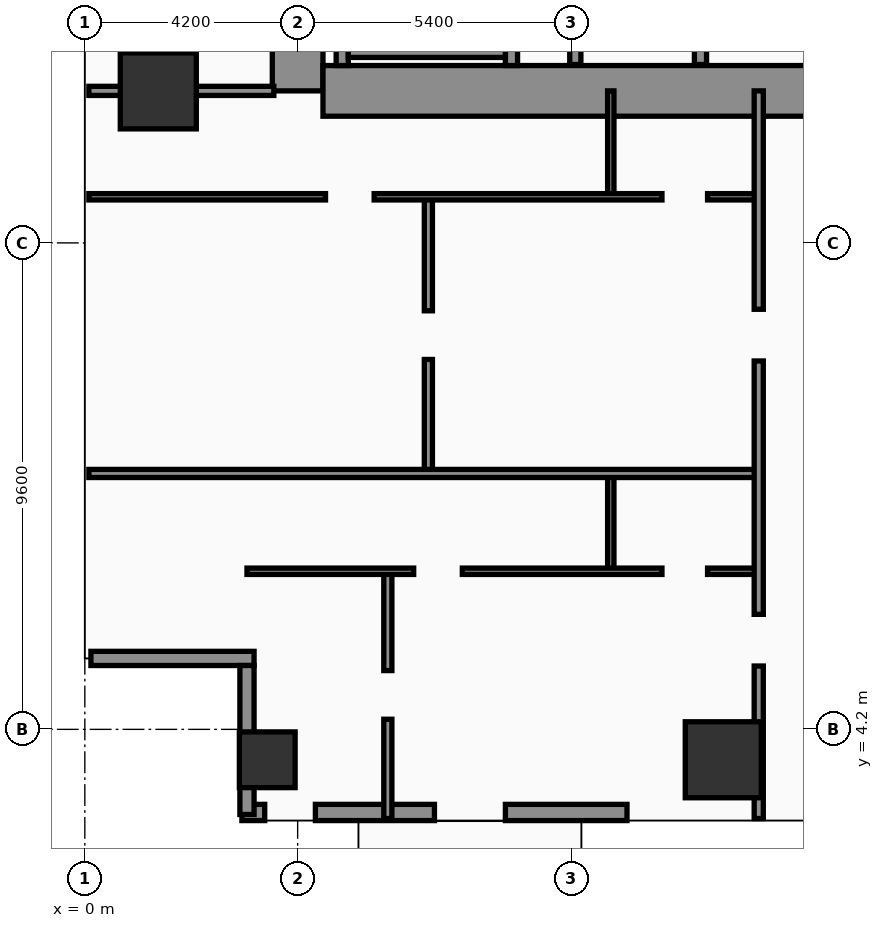
"""IFC4 building model, lengths in metres.
Left out: names, types, materials, properties, quantities, classifications, styles, units other than length and angle.
Written with IfcOpenShell. Run it as: python <this file> out.ifc"""

import sys

from ifc_helpers import new_model, si_unit, direction, frame, frame_2d, origin, origin_2d, place, context, subcontext, project, spatial, rectangle, hollow_rectangle, extrude, element, fill, save


model = new_model("IFC4")
c1 = context("Model", 3, precision=1e-05, world=origin(), true_north=direction((0.0, 1.0)))
c2 = subcontext(c1, "Body", "Model", "MODEL_VIEW")
j1 = project(units=[si_unit("LENGTHUNIT", "METRE"), si_unit("PLANEANGLEUNIT", "RADIAN")], contexts=[c1])
p1 = place(None, origin())
s1 = spatial("IfcSite", under=j1, at=p1, CompositionType="ELEMENT")
p2 = place(p1, origin())
s2 = spatial("IfcBuilding", under=s1, at=p2, CompositionType="ELEMENT")
p3 = place(p2, frame((0.0, 0.0, 66.0)))
s3 = spatial("IfcBuildingStorey", under=s2, at=p3, CompositionType="ELEMENT", Elevation=66.0)
p4 = place(p3, frame((4.2, 16.8, 0.0), z_axis=(0.0, 0.0, 1.0), x_axis=(0.0, 1.0, 0.0)))
e1 = element("IfcWall", 1, at=p4, inside=s3, PredefinedType="SHEAR", context=c2, shape_type="SweptSolid", body=[
    extrude(rectangle(XDim=21.6, YDim=1.0, at=frame_2d((10.8, 0.0))), origin(), (0.0, 0.0, 1.0), 3.56),
])
p5 = place(p3, frame((4.7, 16.8, 0.0), z_axis=(0.0, 0.0, 1.0), x_axis=(1.0, 0.0, 0.0)))
e2 = element("IfcWall", 2, at=p5, inside=s3, PredefinedType="SHEAR", context=c2, shape_type="SweptSolid", body=[
    extrude(rectangle(XDim=9.8, YDim=1.0, at=frame_2d((4.9, 0.0))), origin(), (0.0, 0.0, 1.0), 3.56),
])
p6 = place(p3, frame((5.08, 17.3, 0.0), z_axis=(0.0, 0.0, 1.0), x_axis=(0.0, 1.0, 0.0)))
e3 = element("IfcWall", 3, at=p6, inside=s3, PredefinedType="SOLIDWALL", context=c2, shape_type="SweptSolid", body=[
    extrude(rectangle(XDim=9.49, YDim=0.24, at=frame_2d((4.745, 0.0))), origin(), (0.0, 0.0, 1.0), 3.56),
])
p7 = place(p3, frame((8.42, 17.3, 0.0), z_axis=(0.0, 0.0, 1.0), x_axis=(0.0, 1.0, 0.0)))
e4 = element("IfcWall", 4, at=p7, inside=s3, PredefinedType="SOLIDWALL", context=c2, shape_type="SweptSolid", body=[
    extrude(rectangle(XDim=9.49, YDim=0.24, at=frame_2d((4.745, 0.0))), origin(), (0.0, 0.0, 1.0), 3.56),
])
p8 = place(p7, frame((0.35, 0.0, 0.0)))
e5 = element("IfcOpeningElement", 5, at=p8, cuts=e4, PredefinedType="OPENING", context=c2, shape_type="SweptSolid", body=[
    extrude(rectangle(XDim=1.15, YDim=2.2, at=frame_2d((0.575, 1.1))), frame((0.0, 0.13, 0.0), z_axis=(0.0, -1.0, 0.0), x_axis=(1.0, 0.0, 0.0)), (0.0, 0.0, 1.0), 0.26),
])
p9 = place(p3, frame((5.2, 17.58, 0.0), z_axis=(0.0, 0.0, 1.0), x_axis=(1.0, 0.0, 0.0)))
e6 = element("IfcWall", 6, at=p9, inside=s3, PredefinedType="SOLIDWALL", context=c2, shape_type="SweptSolid", body=[
    extrude(rectangle(XDim=3.1, YDim=0.24, at=frame_2d((1.55, 0.0))), origin(), (0.0, 0.0, 1.0), 3.56),
])
p10 = place(p3, frame((3.6, 3.6, 0.0), z_axis=(0.0, 0.0, 1.0), x_axis=(1.0, 0.0, 0.0)))
e7 = element("IfcColumn", 7, at=p10, inside=s3, PredefinedType="COLUMN", context=c2, shape_type="SweptSolid", body=[
    extrude(hollow_rectangle(XDim=1.1, YDim=1.1, WallThickness=0.045, at=origin_2d()), origin(), (0.0, 0.0, 1.0), 3.56),
])
for number, where, z_axis, x_axis in (
    (8, (1.45, 16.8, 0.0), (0.0, 0.0, 1.0), (1.0, 0.0, 0.0)),
    (9, (12.6, 3.6, 0.0), (0.0, 0.0, 1.0), (1.0, 0.0, 0.0)),
):
    element("IfcColumn", number, at=place(p3, frame(where, z_axis=z_axis, x_axis=x_axis)), inside=s3, PredefinedType="COLUMN", context=c2, shape_type="SweptSolid", body=[
        extrude(rectangle(XDim=1.5, YDim=1.5, at=origin_2d()), origin(), (0.0, 0.0, 1.0), 3.56),
    ])
p11 = place(p3, frame((3.1, 2.56, 0.0), z_axis=(0.0, 0.0, 1.0), x_axis=(1.0, 0.0, 0.0)))
e10 = element("IfcWall", 10, at=p11, inside=s3, PredefinedType="SOLIDWALL", context=c2, shape_type="SweptSolid", body=[
    extrude(rectangle(XDim=7.6, YDim=0.32, at=frame_2d((3.8, 0.0))), origin(), (0.0, 0.0, 1.0), 3.56),
])
p12 = place(p11, frame((0.45, 0.0, 0.75)))
e11 = element("IfcOpeningElement", 11, at=p12, cuts=e10, PredefinedType="OPENING", context=c2, shape_type="SweptSolid", body=[
    extrude(rectangle(XDim=1.0, YDim=1.6, at=frame_2d((0.5, 0.8))), frame((0.0, 0.17, 0.0), z_axis=(0.0, -1.0, 0.0), x_axis=(1.0, 0.0, 0.0)), (0.0, 0.0, 1.0), 0.34),
])
p13 = place(p11, frame((3.8, 0.0, 0.0)))
e12 = element("IfcOpeningElement", 12, at=p13, cuts=e10, PredefinedType="OPENING", context=c2, shape_type="SweptSolid", body=[
    extrude(rectangle(XDim=1.4, YDim=2.25, at=frame_2d((0.7, 1.125))), frame((0.0, 0.17, 0.0), z_axis=(0.0, -1.0, 0.0), x_axis=(1.0, 0.0, 0.0)), (0.0, 0.0, 1.0), 0.34),
])
p14 = place(p3, frame((0.12, 5.6, 0.0), z_axis=(0.0, 0.0, 1.0), x_axis=(1.0, 0.0, 0.0)))
e13 = element("IfcWall", 13, at=p14, inside=s3, PredefinedType="SOLIDWALL", context=c2, shape_type="SweptSolid", body=[
    extrude(rectangle(XDim=3.22, YDim=0.28, at=frame_2d((1.61, 0.0))), origin(), (0.0, 0.0, 1.0), 2.84),
])
p15 = place(p3, frame((3.2, 5.46, 0.0), z_axis=(0.0, 0.0, 1.0), x_axis=(0.0, -1.0, 0.0)))
e14 = element("IfcWall", 14, at=p15, inside=s3, PredefinedType="SOLIDWALL", context=c2, shape_type="SweptSolid", body=[
    extrude(rectangle(XDim=2.94, YDim=0.28, at=frame_2d((1.47, 0.0))), origin(), (0.0, 0.0, 1.0), 2.84),
])
p16 = place(p3, frame((9.68, 17.32, 0.0), z_axis=(0.0, 0.0, 1.0), x_axis=(0.0, 1.0, 0.0)))
e15 = element("IfcWall", 15, at=p16, inside=s3, PredefinedType="SOLIDWALL", context=c2, shape_type="SweptSolid", body=[
    extrude(rectangle(XDim=7.68, YDim=0.22, at=frame_2d((3.84, 0.0))), origin(), (0.0, 0.0, 1.0), 3.56),
])
p17 = place(p3, frame((12.15, 17.32, 0.0), z_axis=(0.0, 0.0, 1.0), x_axis=(0.0, 1.0, 0.0)))
e16 = element("IfcWall", 16, at=p17, inside=s3, PredefinedType="SOLIDWALL", context=c2, shape_type="SweptSolid", body=[
    extrude(rectangle(XDim=7.65, YDim=0.24, at=frame_2d((3.825, 0.0))), origin(), (0.0, 0.0, 1.0), 3.56),
])
p18 = place(p3, frame((0.08, 16.8, 0.0), z_axis=(0.0, 0.0, 1.0), x_axis=(1.0, 0.0, 0.0)))
e17 = element("IfcWall", 17, at=p18, inside=s3, PredefinedType="PARTITIONING", context=c2, shape_type="SweptSolid", body=[
    extrude(rectangle(XDim=3.65, YDim=0.18, at=frame_2d((1.825, 0.0))), origin(), (0.0, 0.0, 1.0), 2.84),
])
p19 = place(p3, frame((10.38, 7.32, 0.0), z_axis=(0.0, 0.0, 1.0), x_axis=(0.0, 1.0, 0.0)))
e18 = element("IfcWall", 18, at=p19, inside=s3, PredefinedType="PARTITIONING", context=c2, shape_type="SweptSolid", body=[
    extrude(rectangle(XDim=1.93, YDim=0.125, at=frame_2d((0.965, 0.0))), origin(), (0.0, 0.0, 1.0), 3.56),
])
p20 = place(p3, frame((5.98, 2.44, 0.0), z_axis=(0.0, 0.0, 1.0), x_axis=(0.0, 1.0, 0.0)))
e19 = element("IfcWall", 19, at=p20, inside=s3, PredefinedType="PARTITIONING", context=c2, shape_type="SweptSolid", body=[
    extrude(rectangle(XDim=4.88, YDim=0.16, at=frame_2d((2.44, 0.0))), origin(), (0.0, 0.0, 1.0), 3.04),
])
p21 = place(p20, frame((1.96, 0.0, 0.0)))
e20 = element("IfcOpeningElement", 20, at=p21, cuts=e19, PredefinedType="OPENING", context=c2, shape_type="SweptSolid", body=[
    extrude(rectangle(XDim=0.96, YDim=2.2, at=frame_2d((0.48, 1.1))), frame((0.0, 0.09, 0.0), z_axis=(0.0, -1.0, 0.0), x_axis=(1.0, 0.0, 0.0)), (0.0, 0.0, 1.0), 0.18),
])
p22 = place(p3, frame((3.2, 7.32, 0.0), z_axis=(0.0, 0.0, 1.0), x_axis=(1.0, 0.0, 0.0)))
e21 = element("IfcWall", 21, at=p22, inside=s3, PredefinedType="PARTITIONING", context=c2, shape_type="SweptSolid", body=[
    extrude(rectangle(XDim=10.1, YDim=0.125, at=frame_2d((5.05, 0.0))), origin(), (0.0, 0.0, 1.0), 2.84),
])
p23 = place(p22, frame((3.29, 0.0, 0.0)))
e22 = element("IfcOpeningElement", 22, at=p23, cuts=e21, PredefinedType="OPENING", context=c2, shape_type="SweptSolid", body=[
    extrude(rectangle(XDim=0.96, YDim=2.2, at=frame_2d((0.48, 1.1))), frame((0.0, 0.073, 0.0), z_axis=(0.0, -1.0, 0.0), x_axis=(1.0, 0.0, 0.0)), (0.0, 0.0, 1.0), 0.145),
])
p24 = place(p22, frame((8.19, 0.0, 0.0)))
e23 = element("IfcOpeningElement", 23, at=p24, cuts=e21, PredefinedType="OPENING", context=c2, shape_type="SweptSolid", body=[
    extrude(rectangle(XDim=0.9, YDim=2.15, at=frame_2d((0.45, 1.075))), frame((0.0, 0.073, 0.0), z_axis=(0.0, -1.0, 0.0), x_axis=(1.0, 0.0, 0.0)), (0.0, 0.0, 1.0), 0.145),
])
p25 = place(p3, frame((10.38, 14.71, 0.0), z_axis=(0.0, 0.0, 1.0), x_axis=(0.0, 1.0, 0.0)))
e24 = element("IfcWall", 24, at=p25, inside=s3, PredefinedType="PARTITIONING", context=c2, shape_type="SweptSolid", body=[
    extrude(rectangle(XDim=2.09, YDim=0.125, at=frame_2d((1.045, 0.0))), origin(), (0.0, 0.0, 1.0), 3.56),
])
p26 = place(p3, frame((6.78, 9.25, 0.0), z_axis=(0.0, 0.0, 1.0), x_axis=(0.0, 1.0, 0.0)))
e25 = element("IfcWall", 25, at=p26, inside=s3, PredefinedType="PARTITIONING", context=c2, shape_type="SweptSolid", body=[
    extrude(rectangle(XDim=5.46, YDim=0.16, at=frame_2d((2.73, 0.0))), origin(), (0.0, 0.0, 1.0), 3.14),
])
p27 = place(p26, frame((2.25, 0.0, 0.0)))
e26 = element("IfcOpeningElement", 26, at=p27, cuts=e25, PredefinedType="OPENING", context=c2, shape_type="SweptSolid", body=[
    extrude(rectangle(XDim=0.96, YDim=2.2, at=frame_2d((0.48, 1.1))), frame((0.0, 0.09, 0.0), z_axis=(0.0, -1.0, 0.0), x_axis=(1.0, 0.0, 0.0)), (0.0, 0.0, 1.0), 0.18),
])
p28 = place(p3, frame((0.08, 14.71, 0.0), z_axis=(0.0, 0.0, 1.0), x_axis=(1.0, 0.0, 0.0)))
e27 = element("IfcWall", 27, at=p28, inside=s3, PredefinedType="PARTITIONING", context=c2, shape_type="SweptSolid", body=[
    extrude(rectangle(XDim=13.22, YDim=0.125, at=frame_2d((6.61, 0.0))), origin(), (0.0, 0.0, 1.0), 2.84),
])
p29 = place(p28, frame((4.67, 0.0, 0.0)))
e28 = element("IfcOpeningElement", 28, at=p29, cuts=e27, PredefinedType="OPENING", context=c2, shape_type="SweptSolid", body=[
    extrude(rectangle(XDim=0.96, YDim=2.2, at=frame_2d((0.48, 1.1))), frame((0.0, 0.073, 0.0), z_axis=(0.0, -1.0, 0.0), x_axis=(1.0, 0.0, 0.0)), (0.0, 0.0, 1.0), 0.145),
])
p30 = place(p28, frame((11.31, 0.0, 0.0)))
e29 = element("IfcOpeningElement", 29, at=p30, cuts=e27, PredefinedType="OPENING", context=c2, shape_type="SweptSolid", body=[
    extrude(rectangle(XDim=0.9, YDim=2.15, at=frame_2d((0.45, 1.075))), frame((0.0, 0.073, 0.0), z_axis=(0.0, -1.0, 0.0), x_axis=(1.0, 0.0, 0.0)), (0.0, 0.0, 1.0), 0.145),
])
p31 = place(p3, frame((0.08, 9.25, 0.0), z_axis=(0.0, 0.0, 1.0), x_axis=(1.0, 0.0, 0.0)))
e30 = element("IfcWall", 30, at=p31, inside=s3, PredefinedType="PARTITIONING", context=c2, shape_type="SweptSolid", body=[
    extrude(rectangle(XDim=13.22, YDim=0.16, at=frame_2d((6.61, 0.0))), origin(), (0.0, 0.0, 1.0), 2.84),
])
p32 = place(p3, frame((13.3, 2.44, 0.0), z_axis=(0.0, 0.0, 1.0), x_axis=(0.0, 1.0, 0.0)))
e31 = element("IfcWall", 31, at=p32, inside=s3, PredefinedType="PARTITIONING", context=c2, shape_type="SweptSolid", body=[
    extrude(rectangle(XDim=14.36, YDim=0.18, at=frame_2d((7.18, 0.0))), origin(), (0.0, 0.0, 1.0), 3.04),
])
p33 = place(p32, frame((3.01, 0.0, 0.0)))
e32 = element("IfcOpeningElement", 32, at=p33, cuts=e31, PredefinedType="OPENING", context=c2, shape_type="SweptSolid", body=[
    extrude(rectangle(XDim=1.02, YDim=2.2, at=frame_2d((0.51, 1.1))), frame((0.0, 0.1, 0.0), z_axis=(0.0, -1.0, 0.0), x_axis=(1.0, 0.0, 0.0)), (0.0, 0.0, 1.0), 0.2),
])
p34 = place(p32, frame((9.03, 0.0, 0.0)))
e33 = element("IfcOpeningElement", 33, at=p34, cuts=e31, PredefinedType="OPENING", context=c2, shape_type="SweptSolid", body=[
    extrude(rectangle(XDim=1.02, YDim=2.2, at=frame_2d((0.51, 1.1))), frame((0.0, 0.1, 0.0), z_axis=(0.0, -1.0, 0.0), x_axis=(1.0, 0.0, 0.0)), (0.0, 0.0, 1.0), 0.2),
])
p35 = place(p12, origin())
e34 = element("IfcWindow", 34, at=p35, inside=s3, PartitioningType="SINGLE_PANEL", PredefinedType="WINDOW", context=c2, shape_type="SweptSolid", body=[
    extrude(rectangle(XDim=1.0, YDim=1.6, at=frame_2d((0.5, 0.8))), frame((0.0, 0.03, 0.0), z_axis=(0.0, -1.0, 0.0), x_axis=(1.0, 0.0, 0.0)), (0.0, 0.0, 1.0), 0.06),
])
fill(e11, e34)
p36 = place(p13, origin())
e35 = element("IfcDoor", 35, at=p36, inside=s3, OperationType="SINGLE_SWING_LEFT", PredefinedType="DOOR", context=c2, shape_type="SweptSolid", body=[
    extrude(rectangle(XDim=1.4, YDim=2.25, at=frame_2d((0.7, 1.125))), frame((0.0, 0.025, 0.0), z_axis=(0.0, -1.0, 0.0), x_axis=(1.0, 0.0, 0.0)), (0.0, 0.0, 1.0), 0.05),
])
fill(e12, e35)
p37 = place(p21, origin())
e36 = element("IfcDoor", 36, at=p37, inside=s3, OperationType="SINGLE_SWING_LEFT", PredefinedType="DOOR", context=c2, shape_type="SweptSolid", body=[
    extrude(rectangle(XDim=0.96, YDim=2.2, at=frame_2d((0.48, 1.1))), frame((0.0, 0.025, 0.0), z_axis=(0.0, -1.0, 0.0), x_axis=(1.0, 0.0, 0.0)), (0.0, 0.0, 1.0), 0.05),
])
fill(e20, e36)
p38 = place(p23, origin())
e37 = element("IfcDoor", 37, at=p38, inside=s3, OperationType="SINGLE_SWING_LEFT", PredefinedType="DOOR", context=c2, shape_type="SweptSolid", body=[
    extrude(rectangle(XDim=0.96, YDim=2.2, at=frame_2d((0.48, 1.1))), frame((0.0, 0.025, 0.0), z_axis=(0.0, -1.0, 0.0), x_axis=(1.0, 0.0, 0.0)), (0.0, 0.0, 1.0), 0.05),
])
fill(e22, e37)
p39 = place(p24, origin())
e38 = element("IfcDoor", 38, at=p39, inside=s3, OperationType="SINGLE_SWING_RIGHT", PredefinedType="DOOR", context=c2, shape_type="SweptSolid", body=[
    extrude(rectangle(XDim=0.9, YDim=2.15, at=frame_2d((0.45, 1.075))), frame((0.0, 0.025, 0.0), z_axis=(0.0, -1.0, 0.0), x_axis=(1.0, 0.0, 0.0)), (0.0, 0.0, 1.0), 0.05),
])
fill(e23, e38)
p40 = place(p27, origin())
e39 = element("IfcDoor", 39, at=p40, inside=s3, OperationType="SINGLE_SWING_LEFT", PredefinedType="DOOR", context=c2, shape_type="SweptSolid", body=[
    extrude(rectangle(XDim=0.96, YDim=2.2, at=frame_2d((0.48, 1.1))), frame((0.0, 0.025, 0.0), z_axis=(0.0, -1.0, 0.0), x_axis=(1.0, 0.0, 0.0)), (0.0, 0.0, 1.0), 0.05),
])
fill(e26, e39)
p41 = place(p29, origin())
e40 = element("IfcDoor", 40, at=p41, inside=s3, OperationType="SINGLE_SWING_LEFT", PredefinedType="DOOR", context=c2, shape_type="SweptSolid", body=[
    extrude(rectangle(XDim=0.96, YDim=2.2, at=frame_2d((0.48, 1.1))), frame((0.0, 0.025, 0.0), z_axis=(0.0, -1.0, 0.0), x_axis=(1.0, 0.0, 0.0)), (0.0, 0.0, 1.0), 0.05),
])
fill(e28, e40)
p42 = place(p30, origin())
e41 = element("IfcDoor", 41, at=p42, inside=s3, OperationType="SINGLE_SWING_RIGHT", PredefinedType="DOOR", context=c2, shape_type="SweptSolid", body=[
    extrude(rectangle(XDim=0.9, YDim=2.15, at=frame_2d((0.45, 1.075))), frame((0.0, 0.025, 0.0), z_axis=(0.0, -1.0, 0.0), x_axis=(1.0, 0.0, 0.0)), (0.0, 0.0, 1.0), 0.05),
])
fill(e29, e41)
p43 = place(p33, origin())
e42 = element("IfcDoor", 42, at=p43, inside=s3, OperationType="SINGLE_SWING_LEFT", PredefinedType="DOOR", context=c2, shape_type="SweptSolid", body=[
    extrude(rectangle(XDim=1.02, YDim=2.2, at=frame_2d((0.51, 1.1))), frame((0.0, 0.025, 0.0), z_axis=(0.0, -1.0, 0.0), x_axis=(1.0, 0.0, 0.0)), (0.0, 0.0, 1.0), 0.05),
])
fill(e32, e42)
p44 = place(p34, origin())
e43 = element("IfcDoor", 43, at=p44, inside=s3, OperationType="SINGLE_SWING_RIGHT", PredefinedType="DOOR", context=c2, shape_type="SweptSolid", body=[
    extrude(rectangle(XDim=1.02, YDim=2.2, at=frame_2d((0.51, 1.1))), frame((0.0, 0.025, 0.0), z_axis=(0.0, -1.0, 0.0), x_axis=(1.0, 0.0, 0.0)), (0.0, 0.0, 1.0), 0.05),
])
fill(e33, e43)
save(model, sys.argv[1])
